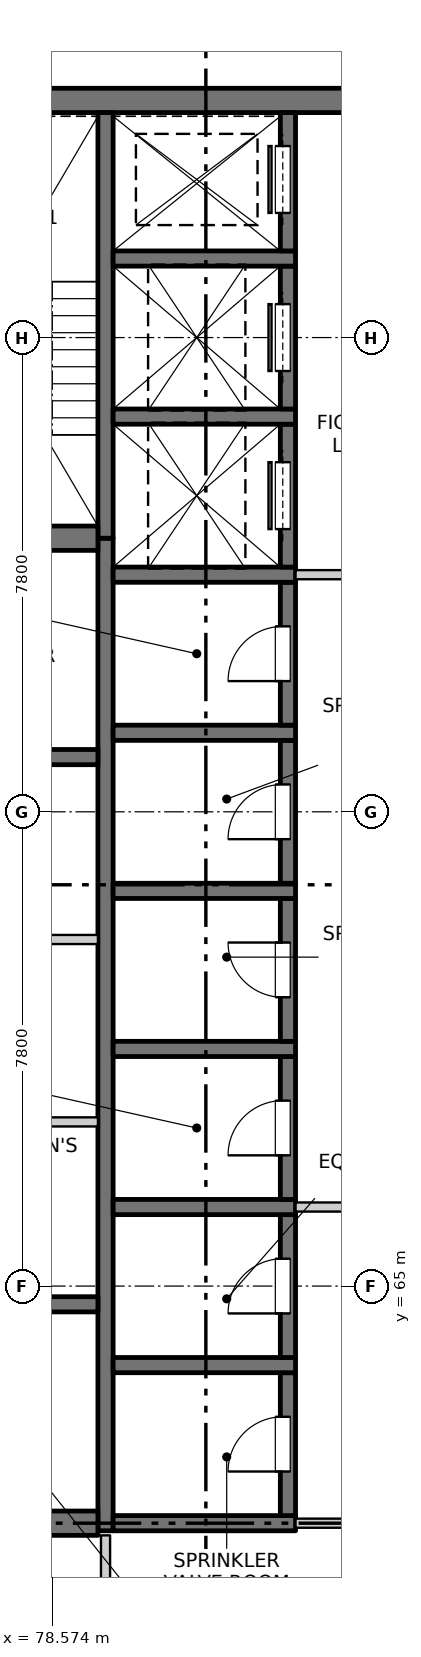
"""IFC4 building model, lengths in metres.
Left out: names, types, materials, properties, quantities, classifications, styles, units other than length and angle.
Written with IfcOpenShell. Run it as: python <this file> out.ifc"""

import sys

from ifc_helpers import new_model, si_unit, direction, frame, frame_2d, origin, place, context, subcontext, project, spatial, rectangle, extrude, element, fill, save


model = new_model("IFC4")
c1 = context("Model", 3, precision=1e-05, world=origin(), true_north=direction((0.0, 1.0)))
c2 = subcontext(c1, "Body", "Model", "MODEL_VIEW")
j1 = project(units=[si_unit("LENGTHUNIT", "METRE"), si_unit("PLANEANGLEUNIT", "RADIAN")], contexts=[c1])
p1 = place(None, origin())
s1 = spatial("IfcSite", under=j1, at=p1, CompositionType="ELEMENT")
p2 = place(p1, origin())
s2 = spatial("IfcBuilding", under=s1, at=p2, CompositionType="ELEMENT")
p3 = place(p2, frame((0.0, 0.0, 200.7)))
s3 = spatial("IfcBuildingStorey", under=s2, at=p3, CompositionType="ELEMENT", Elevation=200.7)
p4 = place(p3, frame((75.45, 84.5, -0.25), z_axis=(0.0, 0.0, 1.0), x_axis=(1.0, 0.0, 0.0)))
e1 = element("IfcWall", 1, at=p4, inside=s3, PredefinedType="SOLIDWALL", context=c2, shape_type="SweptSolid", body=[
    extrude(rectangle(XDim=19.1, YDim=0.4, at=frame_2d((9.55, 0.0))), origin(), (0.0, 0.0, 1.0), 3.4),
])
p5 = place(p3, frame((79.45, 60.975, -0.25), z_axis=(0.0, 0.0, 1.0), x_axis=(0.0, 1.0, 0.0)))
e2 = element("IfcWall", 2, at=p5, inside=s3, PredefinedType="SOLIDWALL", context=c2, shape_type="SweptSolid", body=[
    extrude(rectangle(XDim=16.325, YDim=0.25, at=frame_2d((8.163, 0.0))), origin(), (0.0, 0.0, 1.0), 3.4),
])
p6 = place(p3, frame((79.45, 77.3, -0.25), z_axis=(0.0, 0.0, 1.0), x_axis=(0.0, 1.0, 0.0)))
e3 = element("IfcWall", 3, at=p6, inside=s3, PredefinedType="SOLIDWALL", context=c2, shape_type="SweptSolid", body=[
    extrude(rectangle(XDim=7.0, YDim=0.25, at=frame_2d((3.5, 0.0))), origin(), (0.0, 0.0, 1.0), 3.4),
])
p7 = place(p3, frame((79.575, 61.1, -0.25), z_axis=(0.0, 0.0, 1.0), x_axis=(1.0, 0.0, 0.0)))
e4 = element("IfcWall", 4, at=p7, inside=s3, PredefinedType="SOLIDWALL", context=c2, shape_type="SweptSolid", body=[
    extrude(rectangle(XDim=3.0, YDim=0.25, at=frame_2d((1.5, 0.0))), origin(), (0.0, 0.0, 1.0), 3.4),
])
p8 = place(p3, frame((82.45, 61.225, -0.25), z_axis=(0.0, 0.0, 1.0), x_axis=(0.0, 1.0, 0.0)))
e5 = element("IfcWall", 5, at=p8, inside=s3, PredefinedType="SOLIDWALL", context=c2, shape_type="SweptSolid", body=[
    extrude(rectangle(XDim=2.35, YDim=0.25, at=frame_2d((1.175, 0.0))), origin(), (0.0, 0.0, 1.0), 3.4),
])
p9 = place(p8, frame((0.725, 0.0, 0.25)))
e6 = element("IfcOpeningElement", 6, at=p9, cuts=e5, PredefinedType="OPENING", context=c2, shape_type="SweptSolid", body=[
    extrude(rectangle(XDim=0.9, YDim=2.1, at=frame_2d((0.45, 1.05))), frame((0.0, 0.135, 0.0), z_axis=(0.0, -1.0, 0.0), x_axis=(1.0, 0.0, 0.0)), (0.0, 0.0, 1.0), 0.27),
])
p10 = place(p3, frame((79.575, 63.7, -0.25), z_axis=(0.0, 0.0, 1.0), x_axis=(1.0, 0.0, 0.0)))
e7 = element("IfcWall", 7, at=p10, inside=s3, PredefinedType="SOLIDWALL", context=c2, shape_type="SweptSolid", body=[
    extrude(rectangle(XDim=3.0, YDim=0.25, at=frame_2d((1.5, 0.0))), origin(), (0.0, 0.0, 1.0), 3.4),
])
p11 = place(p3, frame((82.45, 63.825, -0.25), z_axis=(0.0, 0.0, 1.0), x_axis=(0.0, 1.0, 0.0)))
e8 = element("IfcWall", 8, at=p11, inside=s3, PredefinedType="SOLIDWALL", context=c2, shape_type="SweptSolid", body=[
    extrude(rectangle(XDim=2.35, YDim=0.25, at=frame_2d((1.175, 0.0))), origin(), (0.0, 0.0, 1.0), 3.4),
])
p12 = place(p11, frame((0.725, 0.0, 0.25)))
e9 = element("IfcOpeningElement", 9, at=p12, cuts=e8, PredefinedType="OPENING", context=c2, shape_type="SweptSolid", body=[
    extrude(rectangle(XDim=0.9, YDim=2.1, at=frame_2d((0.45, 1.05))), frame((0.0, 0.135, 0.0), z_axis=(0.0, -1.0, 0.0), x_axis=(1.0, 0.0, 0.0)), (0.0, 0.0, 1.0), 0.27),
])
p13 = place(p3, frame((79.575, 66.3, -0.25), z_axis=(0.0, 0.0, 1.0), x_axis=(1.0, 0.0, 0.0)))
e10 = element("IfcWall", 10, at=p13, inside=s3, PredefinedType="SOLIDWALL", context=c2, shape_type="SweptSolid", body=[
    extrude(rectangle(XDim=3.0, YDim=0.25, at=frame_2d((1.5, 0.0))), origin(), (0.0, 0.0, 1.0), 3.4),
])
p14 = place(p3, frame((82.45, 66.425, -0.25), z_axis=(0.0, 0.0, 1.0), x_axis=(0.0, 1.0, 0.0)))
e11 = element("IfcWall", 11, at=p14, inside=s3, PredefinedType="SOLIDWALL", context=c2, shape_type="SweptSolid", body=[
    extrude(rectangle(XDim=2.35, YDim=0.25, at=frame_2d((1.175, 0.0))), origin(), (0.0, 0.0, 1.0), 3.4),
])
p15 = place(p14, frame((0.725, 0.0, 0.25)))
e12 = element("IfcOpeningElement", 12, at=p15, cuts=e11, PredefinedType="OPENING", context=c2, shape_type="SweptSolid", body=[
    extrude(rectangle(XDim=0.9, YDim=2.1, at=frame_2d((0.45, 1.05))), frame((0.0, 0.135, 0.0), z_axis=(0.0, -1.0, 0.0), x_axis=(1.0, 0.0, 0.0)), (0.0, 0.0, 1.0), 0.27),
])
p16 = place(p3, frame((79.575, 68.9, -0.25), z_axis=(0.0, 0.0, 1.0), x_axis=(1.0, 0.0, 0.0)))
e13 = element("IfcWall", 13, at=p16, inside=s3, PredefinedType="SOLIDWALL", context=c2, shape_type="SweptSolid", body=[
    extrude(rectangle(XDim=3.0, YDim=0.25, at=frame_2d((1.5, 0.0))), origin(), (0.0, 0.0, 1.0), 3.4),
])
p17 = place(p3, frame((82.45, 69.025, -0.25), z_axis=(0.0, 0.0, 1.0), x_axis=(0.0, 1.0, 0.0)))
e14 = element("IfcWall", 14, at=p17, inside=s3, PredefinedType="SOLIDWALL", context=c2, shape_type="SweptSolid", body=[
    extrude(rectangle(XDim=2.35, YDim=0.25, at=frame_2d((1.175, 0.0))), origin(), (0.0, 0.0, 1.0), 3.4),
])
p18 = place(p17, frame((0.725, 0.0, 0.25)))
e15 = element("IfcOpeningElement", 15, at=p18, cuts=e14, PredefinedType="OPENING", context=c2, shape_type="SweptSolid", body=[
    extrude(rectangle(XDim=0.9, YDim=2.1, at=frame_2d((0.45, 1.05))), frame((0.0, 0.135, 0.0), z_axis=(0.0, -1.0, 0.0), x_axis=(1.0, 0.0, 0.0)), (0.0, 0.0, 1.0), 0.27),
])
p19 = place(p3, frame((79.575, 71.5, -0.25), z_axis=(0.0, 0.0, 1.0), x_axis=(1.0, 0.0, 0.0)))
e16 = element("IfcWall", 16, at=p19, inside=s3, PredefinedType="SOLIDWALL", context=c2, shape_type="SweptSolid", body=[
    extrude(rectangle(XDim=3.0, YDim=0.25, at=frame_2d((1.5, 0.0))), origin(), (0.0, 0.0, 1.0), 3.4),
])
p20 = place(p3, frame((82.45, 71.625, -0.25), z_axis=(0.0, 0.0, 1.0), x_axis=(0.0, 1.0, 0.0)))
e17 = element("IfcWall", 17, at=p20, inside=s3, PredefinedType="SOLIDWALL", context=c2, shape_type="SweptSolid", body=[
    extrude(rectangle(XDim=2.35, YDim=0.25, at=frame_2d((1.175, 0.0))), origin(), (0.0, 0.0, 1.0), 3.4),
])
p21 = place(p20, frame((0.725, 0.0, 0.25)))
e18 = element("IfcOpeningElement", 18, at=p21, cuts=e17, PredefinedType="OPENING", context=c2, shape_type="SweptSolid", body=[
    extrude(rectangle(XDim=0.9, YDim=2.1, at=frame_2d((0.45, 1.05))), frame((0.0, 0.135, 0.0), z_axis=(0.0, -1.0, 0.0), x_axis=(1.0, 0.0, 0.0)), (0.0, 0.0, 1.0), 0.27),
])
p22 = place(p3, frame((79.575, 74.1, -0.25), z_axis=(0.0, 0.0, 1.0), x_axis=(1.0, 0.0, 0.0)))
e19 = element("IfcWall", 19, at=p22, inside=s3, PredefinedType="SOLIDWALL", context=c2, shape_type="SweptSolid", body=[
    extrude(rectangle(XDim=3.0, YDim=0.25, at=frame_2d((1.5, 0.0))), origin(), (0.0, 0.0, 1.0), 3.4),
])
p23 = place(p3, frame((82.45, 74.225, -0.25), z_axis=(0.0, 0.0, 1.0), x_axis=(0.0, 1.0, 0.0)))
e20 = element("IfcWall", 20, at=p23, inside=s3, PredefinedType="SOLIDWALL", context=c2, shape_type="SweptSolid", body=[
    extrude(rectangle(XDim=2.35, YDim=0.25, at=frame_2d((1.175, 0.0))), origin(), (0.0, 0.0, 1.0), 3.4),
])
p24 = place(p23, frame((0.725, 0.0, 0.25)))
e21 = element("IfcOpeningElement", 21, at=p24, cuts=e20, PredefinedType="OPENING", context=c2, shape_type="SweptSolid", body=[
    extrude(rectangle(XDim=0.9, YDim=2.1, at=frame_2d((0.45, 1.05))), frame((0.0, 0.135, 0.0), z_axis=(0.0, -1.0, 0.0), x_axis=(1.0, 0.0, 0.0)), (0.0, 0.0, 1.0), 0.27),
])
p25 = place(p3, frame((79.575, 76.7, -0.25), z_axis=(0.0, 0.0, 1.0), x_axis=(1.0, 0.0, 0.0)))
e22 = element("IfcWall", 22, at=p25, inside=s3, PredefinedType="SOLIDWALL", context=c2, shape_type="SweptSolid", body=[
    extrude(rectangle(XDim=3.0, YDim=0.25, at=frame_2d((1.5, 0.0))), origin(), (0.0, 0.0, 1.0), 3.4),
])
p26 = place(p3, frame((82.45, 76.825, -0.25), z_axis=(0.0, 0.0, 1.0), x_axis=(0.0, 1.0, 0.0)))
e23 = element("IfcWall", 23, at=p26, inside=s3, PredefinedType="SOLIDWALL", context=c2, shape_type="SweptSolid", body=[
    extrude(rectangle(XDim=2.35, YDim=0.25, at=frame_2d((1.175, 0.0))), origin(), (0.0, 0.0, 1.0), 3.4),
])
p27 = place(p26, frame((0.625, 0.0, 0.25)))
e24 = element("IfcOpeningElement", 24, at=p27, cuts=e23, PredefinedType="OPENING", context=c2, shape_type="SweptSolid", body=[
    extrude(rectangle(XDim=1.1, YDim=2.1, at=frame_2d((0.55, 1.05))), frame((0.0, 0.135, 0.0), z_axis=(0.0, -1.0, 0.0), x_axis=(1.0, 0.0, 0.0)), (0.0, 0.0, 1.0), 0.27),
])
p28 = place(p3, frame((79.575, 79.3, -0.25), z_axis=(0.0, 0.0, 1.0), x_axis=(1.0, 0.0, 0.0)))
e25 = element("IfcWall", 25, at=p28, inside=s3, PredefinedType="SOLIDWALL", context=c2, shape_type="SweptSolid", body=[
    extrude(rectangle(XDim=3.0, YDim=0.25, at=frame_2d((1.5, 0.0))), origin(), (0.0, 0.0, 1.0), 3.4),
])
p29 = place(p3, frame((82.45, 79.425, -0.25), z_axis=(0.0, 0.0, 1.0), x_axis=(0.0, 1.0, 0.0)))
e26 = element("IfcWall", 26, at=p29, inside=s3, PredefinedType="SOLIDWALL", context=c2, shape_type="SweptSolid", body=[
    extrude(rectangle(XDim=2.35, YDim=0.25, at=frame_2d((1.175, 0.0))), origin(), (0.0, 0.0, 1.0), 3.4),
])
p30 = place(p29, frame((0.625, 0.0, 0.25)))
e27 = element("IfcOpeningElement", 27, at=p30, cuts=e26, PredefinedType="OPENING", context=c2, shape_type="SweptSolid", body=[
    extrude(rectangle(XDim=1.1, YDim=2.1, at=frame_2d((0.55, 1.05))), frame((0.0, 0.135, 0.0), z_axis=(0.0, -1.0, 0.0), x_axis=(1.0, 0.0, 0.0)), (0.0, 0.0, 1.0), 0.27),
])
p31 = place(p3, frame((79.575, 81.9, -0.25), z_axis=(0.0, 0.0, 1.0), x_axis=(1.0, 0.0, 0.0)))
e28 = element("IfcWall", 28, at=p31, inside=s3, PredefinedType="SOLIDWALL", context=c2, shape_type="SweptSolid", body=[
    extrude(rectangle(XDim=3.0, YDim=0.25, at=frame_2d((1.5, 0.0))), origin(), (0.0, 0.0, 1.0), 3.4),
])
p32 = place(p3, frame((82.45, 82.025, -0.25), z_axis=(0.0, 0.0, 1.0), x_axis=(0.0, 1.0, 0.0)))
e29 = element("IfcWall", 29, at=p32, inside=s3, PredefinedType="SOLIDWALL", context=c2, shape_type="SweptSolid", body=[
    extrude(rectangle(XDim=2.275, YDim=0.25, at=frame_2d((1.138, 0.0))), origin(), (0.0, 0.0, 1.0), 3.4),
])
p33 = place(p32, frame((0.625, 0.0, 0.25)))
e30 = element("IfcOpeningElement", 30, at=p33, cuts=e29, PredefinedType="OPENING", context=c2, shape_type="SweptSolid", body=[
    extrude(rectangle(XDim=1.1, YDim=2.1, at=frame_2d((0.55, 1.05))), frame((0.0, 0.135, 0.0), z_axis=(0.0, -1.0, 0.0), x_axis=(1.0, 0.0, 0.0)), (0.0, 0.0, 1.0), 0.27),
])
p34 = place(p3, frame((75.45, 61.1, -0.25), z_axis=(0.0, 0.0, 1.0), x_axis=(1.0, 0.0, 0.0)))
e31 = element("IfcWall", 31, at=p34, inside=s3, PredefinedType="SOLIDWALL", context=c2, shape_type="SweptSolid", body=[
    extrude(rectangle(XDim=3.875, YDim=0.4, at=frame_2d((1.938, 0.0))), origin(), (0.0, 0.0, 1.0), 3.4),
])
for number, where, z_axis, x_axis in (
    (32, (75.45, 64.7, -0.25), (0.0, 0.0, 1.0), (1.0, 0.0, 0.0)),
    (33, (75.45, 73.7, -0.25), (0.0, 0.0, 1.0), (1.0, 0.0, 0.0)),
):
    element("IfcWall", number, at=place(p3, frame(where, z_axis=z_axis, x_axis=x_axis)), inside=s3, PredefinedType="SOLIDWALL", context=c2, shape_type="SweptSolid", body=[
        extrude(rectangle(XDim=3.875, YDim=0.25, at=frame_2d((1.938, 0.0))), origin(), (0.0, 0.0, 1.0), 3.4),
    ])
p35 = place(p3, frame((75.45, 77.3, -0.25), z_axis=(0.0, 0.0, 1.0), x_axis=(1.0, 0.0, 0.0)))
e34 = element("IfcWall", 34, at=p35, inside=s3, PredefinedType="SOLIDWALL", context=c2, shape_type="SweptSolid", body=[
    extrude(rectangle(XDim=3.875, YDim=0.4, at=frame_2d((1.938, 0.0))), origin(), (0.0, 0.0, 1.0), 3.4),
])
p36 = place(p3, frame((82.575, 61.1, 0.0), z_axis=(0.0, 0.0, 1.0), x_axis=(1.0, 0.0, 0.0)))
e35 = element("IfcWall", 35, at=p36, inside=s3, PredefinedType="PARTITIONING", context=c2, shape_type="SweptSolid", body=[
    extrude(rectangle(XDim=4.85, YDim=0.15, at=frame_2d((2.425, 0.0))), origin(), (0.0, 0.0, 1.0), 3.15),
])
p37 = place(p36, frame((1.525, 0.0, 0.0)))
e36 = element("IfcOpeningElement", 36, at=p37, cuts=e35, PredefinedType="OPENING", context=c2, shape_type="SweptSolid", body=[
    extrude(rectangle(XDim=1.8, YDim=2.1, at=frame_2d((0.9, 1.05))), frame((0.0, 0.085, 0.0), z_axis=(0.0, -1.0, 0.0), x_axis=(1.0, 0.0, 0.0)), (0.0, 0.0, 1.0), 0.17),
])
p38 = place(p3, frame((82.575, 66.3, 0.0), z_axis=(0.0, 0.0, 1.0), x_axis=(1.0, 0.0, 0.0)))
e37 = element("IfcWall", 37, at=p38, inside=s3, PredefinedType="PARTITIONING", context=c2, shape_type="SweptSolid", body=[
    extrude(rectangle(XDim=4.85, YDim=0.15, at=frame_2d((2.425, 0.0))), origin(), (0.0, 0.0, 1.0), 3.15),
])
p39 = place(p38, frame((1.525, 0.0, 0.0)))
e38 = element("IfcOpeningElement", 38, at=p39, cuts=e37, PredefinedType="OPENING", context=c2, shape_type="SweptSolid", body=[
    extrude(rectangle(XDim=1.8, YDim=2.1, at=frame_2d((0.9, 1.05))), frame((0.0, 0.085, 0.0), z_axis=(0.0, -1.0, 0.0), x_axis=(1.0, 0.0, 0.0)), (0.0, 0.0, 1.0), 0.17),
])
for number, where, z_axis, x_axis in (
    (39, (75.45, 67.7, 0.0), (0.0, 0.0, 1.0), (1.0, 0.0, 0.0)),
    (40, (75.45, 70.7, 0.0), (0.0, 0.0, 1.0), (1.0, 0.0, 0.0)),
):
    element("IfcWall", number, at=place(p3, frame(where, z_axis=z_axis, x_axis=x_axis)), inside=s3, PredefinedType="PARTITIONING", context=c2, shape_type="SweptSolid", body=[
        extrude(rectangle(XDim=3.875, YDim=0.15, at=frame_2d((1.938, 0.0))), origin(), (0.0, 0.0, 1.0), 3.15),
    ])
p40 = place(p3, frame((82.575, 76.7, 0.0), z_axis=(0.0, 0.0, 1.0), x_axis=(1.0, 0.0, 0.0)))
e41 = element("IfcWall", 41, at=p40, inside=s3, PredefinedType="PARTITIONING", context=c2, shape_type="SweptSolid", body=[
    extrude(rectangle(XDim=4.85, YDim=0.15, at=frame_2d((2.425, 0.0))), origin(), (0.0, 0.0, 1.0), 3.15),
])
p41 = place(p40, frame((1.525, 0.0, 0.0)))
e42 = element("IfcOpeningElement", 42, at=p41, cuts=e41, PredefinedType="OPENING", context=c2, shape_type="SweptSolid", body=[
    extrude(rectangle(XDim=1.8, YDim=2.1, at=frame_2d((0.9, 1.05))), frame((0.0, 0.085, 0.0), z_axis=(0.0, -1.0, 0.0), x_axis=(1.0, 0.0, 0.0)), (0.0, 0.0, 1.0), 0.17),
])
p42 = place(p3, frame((79.45, 55.45, 0.0), z_axis=(0.0, 0.0, 1.0), x_axis=(0.0, 1.0, 0.0)))
e43 = element("IfcWall", 43, at=p42, inside=s3, PredefinedType="PARTITIONING", context=c2, shape_type="SweptSolid", body=[
    extrude(rectangle(XDim=5.45, YDim=0.15, at=frame_2d((2.725, 0.0))), origin(), (0.0, 0.0, 1.0), 3.15),
])
p43 = place(p42, frame((2.25, 0.0, 0.0)))
e44 = element("IfcOpeningElement", 44, at=p43, cuts=e43, PredefinedType="OPENING", context=c2, shape_type="SweptSolid", body=[
    extrude(rectangle(XDim=0.9, YDim=2.1, at=frame_2d((0.45, 1.05))), frame((0.0, 0.085, 0.0), z_axis=(0.0, -1.0, 0.0), x_axis=(1.0, 0.0, 0.0)), (0.0, 0.0, 1.0), 0.17),
])
p44 = place(p9, origin())
e45 = element("IfcDoor", 45, at=p44, inside=s3, OperationType="SINGLE_SWING_LEFT", PredefinedType="DOOR", context=c2, shape_type="SweptSolid", body=[
    extrude(rectangle(XDim=0.9, YDim=2.1, at=frame_2d((0.45, 1.05))), frame((0.0, 0.11, 0.0), z_axis=(0.0, -1.0, 0.0), x_axis=(1.0, 0.0, 0.0)), (0.0, 0.0, 1.0), 0.05),
])
fill(e6, e45)
p45 = place(p12, origin())
e46 = element("IfcDoor", 46, at=p45, inside=s3, OperationType="SINGLE_SWING_LEFT", PredefinedType="DOOR", context=c2, shape_type="SweptSolid", body=[
    extrude(rectangle(XDim=0.9, YDim=2.1, at=frame_2d((0.45, 1.05))), frame((0.0, 0.11, 0.0), z_axis=(0.0, -1.0, 0.0), x_axis=(1.0, 0.0, 0.0)), (0.0, 0.0, 1.0), 0.05),
])
fill(e9, e46)
p46 = place(p15, origin())
e47 = element("IfcDoor", 47, at=p46, inside=s3, OperationType="SINGLE_SWING_LEFT", PredefinedType="DOOR", context=c2, shape_type="SweptSolid", body=[
    extrude(rectangle(XDim=0.9, YDim=2.1, at=frame_2d((0.45, 1.05))), frame((0.0, 0.11, 0.0), z_axis=(0.0, -1.0, 0.0), x_axis=(1.0, 0.0, 0.0)), (0.0, 0.0, 1.0), 0.05),
])
fill(e12, e47)
p47 = place(p18, origin())
e48 = element("IfcDoor", 48, at=p47, inside=s3, OperationType="SINGLE_SWING_RIGHT", PredefinedType="DOOR", context=c2, shape_type="SweptSolid", body=[
    extrude(rectangle(XDim=0.9, YDim=2.1, at=frame_2d((0.45, 1.05))), frame((0.0, 0.11, 0.0), z_axis=(0.0, -1.0, 0.0), x_axis=(1.0, 0.0, 0.0)), (0.0, 0.0, 1.0), 0.05),
])
fill(e15, e48)
p48 = place(p21, origin())
e49 = element("IfcDoor", 49, at=p48, inside=s3, OperationType="SINGLE_SWING_LEFT", PredefinedType="DOOR", context=c2, shape_type="SweptSolid", body=[
    extrude(rectangle(XDim=0.9, YDim=2.1, at=frame_2d((0.45, 1.05))), frame((0.0, 0.11, 0.0), z_axis=(0.0, -1.0, 0.0), x_axis=(1.0, 0.0, 0.0)), (0.0, 0.0, 1.0), 0.05),
])
fill(e18, e49)
p49 = place(p24, origin())
e50 = element("IfcDoor", 50, at=p49, inside=s3, OperationType="SINGLE_SWING_LEFT", PredefinedType="DOOR", context=c2, shape_type="SweptSolid", body=[
    extrude(rectangle(XDim=0.9, YDim=2.1, at=frame_2d((0.45, 1.05))), frame((0.0, 0.11, 0.0), z_axis=(0.0, -1.0, 0.0), x_axis=(1.0, 0.0, 0.0)), (0.0, 0.0, 1.0), 0.05),
])
fill(e21, e50)
p50 = place(p27, origin())
e51 = element("IfcDoor", 51, at=p50, inside=s3, OperationType="SLIDING_TO_LEFT", PredefinedType="DOOR", context=c2, shape_type="SweptSolid", body=[
    extrude(rectangle(XDim=1.1, YDim=2.1, at=frame_2d((0.55, 1.05))), frame((0.0, 0.11, 0.0), z_axis=(0.0, -1.0, 0.0), x_axis=(1.0, 0.0, 0.0)), (0.0, 0.0, 1.0), 0.05),
])
fill(e24, e51)
p51 = place(p30, origin())
e52 = element("IfcDoor", 52, at=p51, inside=s3, OperationType="SLIDING_TO_LEFT", PredefinedType="DOOR", context=c2, shape_type="SweptSolid", body=[
    extrude(rectangle(XDim=1.1, YDim=2.1, at=frame_2d((0.55, 1.05))), frame((0.0, 0.11, 0.0), z_axis=(0.0, -1.0, 0.0), x_axis=(1.0, 0.0, 0.0)), (0.0, 0.0, 1.0), 0.05),
])
fill(e27, e52)
p52 = place(p33, origin())
e53 = element("IfcDoor", 53, at=p52, inside=s3, OperationType="SLIDING_TO_RIGHT", PredefinedType="DOOR", context=c2, shape_type="SweptSolid", body=[
    extrude(rectangle(XDim=1.1, YDim=2.1, at=frame_2d((0.55, 1.05))), frame((0.0, 0.11, 0.0), z_axis=(0.0, -1.0, 0.0), x_axis=(1.0, 0.0, 0.0)), (0.0, 0.0, 1.0), 0.05),
])
fill(e30, e53)
save(model, sys.argv[1])
